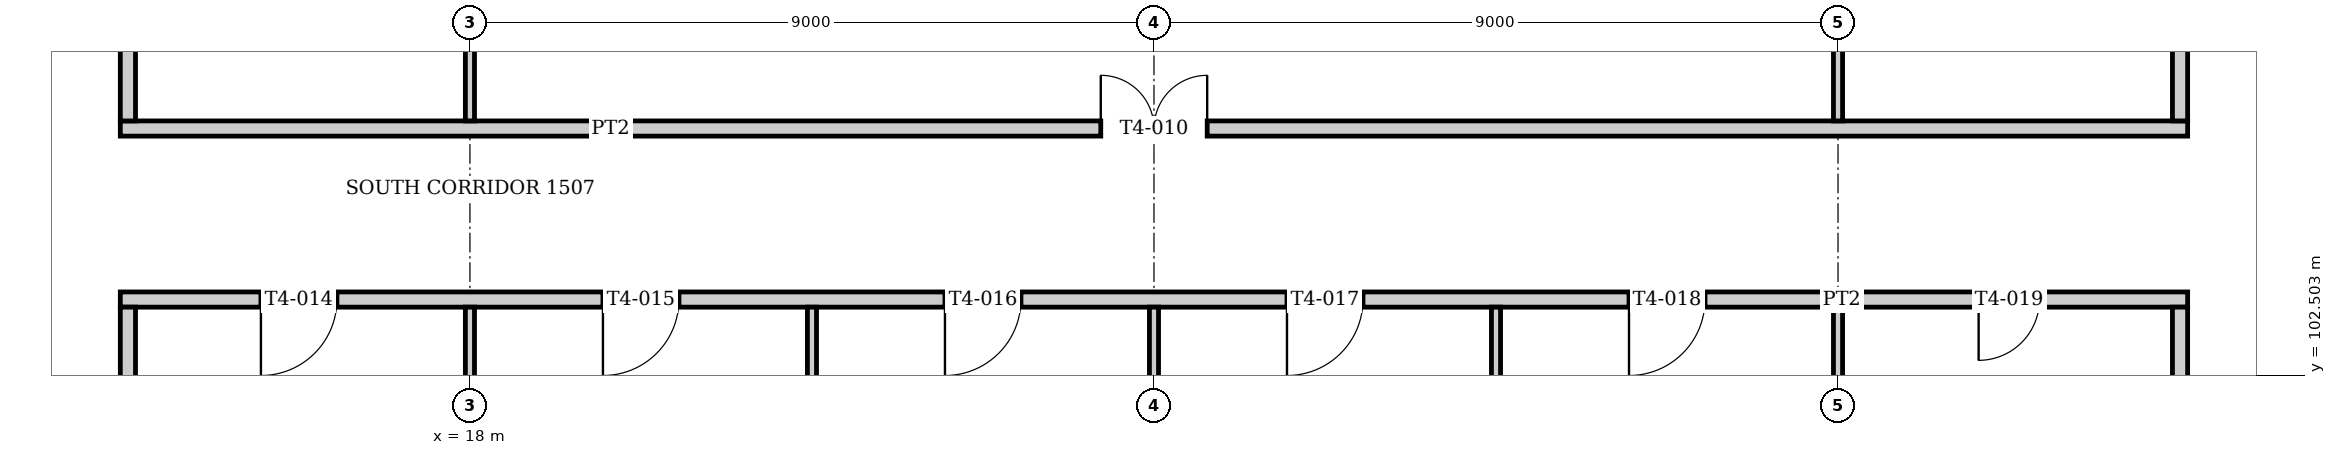
"""IFC4 building model, lengths in metres.
Left out: names, types, materials, properties, quantities, classifications, styles, units other than length and angle.
Written with IfcOpenShell. Run it as: python <this file> out.ifc"""

import sys

from ifc_helpers import new_model, si_unit, direction, frame, frame_2d, origin, place, context, subcontext, project, spatial, rectangle, extrude, element, fill, save


model = new_model("IFC4")
c1 = context("Model", 3, precision=1e-05, world=origin(), true_north=direction((0.0, 1.0)))
c2 = subcontext(c1, "Body", "Model", "MODEL_VIEW")
j1 = project(units=[si_unit("LENGTHUNIT", "METRE"), si_unit("PLANEANGLEUNIT", "RADIAN")], contexts=[c1])
p1 = place(None, origin())
s1 = spatial("IfcSite", under=j1, at=p1, CompositionType="ELEMENT")
p2 = place(p1, origin())
s2 = spatial("IfcBuilding", under=s1, at=p2, CompositionType="ELEMENT")
p3 = place(p2, frame((0.0, 0.0, 63.2)))
s3 = spatial("IfcBuildingStorey", under=s2, at=p3, CompositionType="ELEMENT", Elevation=63.2)
p4 = place(p3, frame((13.4, 103.5, 0.0), z_axis=(0.0, 0.0, 1.0), x_axis=(1.0, 0.0, 0.0)))
e1 = element("IfcWall", 1, at=p4, inside=s3, PredefinedType="PARTITIONING", context=c2, shape_type="SweptSolid", body=[
    extrude(rectangle(XDim=27.2, YDim=0.2, at=frame_2d((13.6, 0.0))), origin(), (0.0, 0.0, 1.0), 3.05),
])
p5 = place(p4, frame((1.85, 0.0, 0.0)))
e2 = element("IfcOpeningElement", 2, at=p5, cuts=e1, PredefinedType="OPENING", context=c2, shape_type="SweptSolid", body=[
    extrude(rectangle(XDim=1.0, YDim=2.1, at=frame_2d((0.5, 1.05))), frame((0.0, 0.11, 0.0), z_axis=(0.0, -1.0, 0.0), x_axis=(1.0, 0.0, 0.0)), (0.0, 0.0, 1.0), 0.22),
])
p6 = place(p4, frame((6.35, 0.0, 0.0)))
e3 = element("IfcOpeningElement", 3, at=p6, cuts=e1, PredefinedType="OPENING", context=c2, shape_type="SweptSolid", body=[
    extrude(rectangle(XDim=1.0, YDim=2.1, at=frame_2d((0.5, 1.05))), frame((0.0, 0.11, 0.0), z_axis=(0.0, -1.0, 0.0), x_axis=(1.0, 0.0, 0.0)), (0.0, 0.0, 1.0), 0.22),
])
p7 = place(p4, frame((10.85, 0.0, 0.0)))
e4 = element("IfcOpeningElement", 4, at=p7, cuts=e1, PredefinedType="OPENING", context=c2, shape_type="SweptSolid", body=[
    extrude(rectangle(XDim=1.0, YDim=2.1, at=frame_2d((0.5, 1.05))), frame((0.0, 0.11, 0.0), z_axis=(0.0, -1.0, 0.0), x_axis=(1.0, 0.0, 0.0)), (0.0, 0.0, 1.0), 0.22),
])
p8 = place(p4, frame((15.35, 0.0, 0.0)))
e5 = element("IfcOpeningElement", 5, at=p8, cuts=e1, PredefinedType="OPENING", context=c2, shape_type="SweptSolid", body=[
    extrude(rectangle(XDim=1.0, YDim=2.1, at=frame_2d((0.5, 1.05))), frame((0.0, 0.11, 0.0), z_axis=(0.0, -1.0, 0.0), x_axis=(1.0, 0.0, 0.0)), (0.0, 0.0, 1.0), 0.22),
])
p9 = place(p4, frame((19.85, 0.0, 0.0)))
e6 = element("IfcOpeningElement", 6, at=p9, cuts=e1, PredefinedType="OPENING", context=c2, shape_type="SweptSolid", body=[
    extrude(rectangle(XDim=1.0, YDim=2.1, at=frame_2d((0.5, 1.05))), frame((0.0, 0.11, 0.0), z_axis=(0.0, -1.0, 0.0), x_axis=(1.0, 0.0, 0.0)), (0.0, 0.0, 1.0), 0.22),
])
p10 = place(p4, frame((24.45, 0.0, 0.0)))
e7 = element("IfcOpeningElement", 7, at=p10, cuts=e1, PredefinedType="OPENING", context=c2, shape_type="SweptSolid", body=[
    extrude(rectangle(XDim=0.8, YDim=2.1, at=frame_2d((0.4, 1.05))), frame((0.0, 0.11, 0.0), z_axis=(0.0, -1.0, 0.0), x_axis=(1.0, 0.0, 0.0)), (0.0, 0.0, 1.0), 0.22),
])
p11 = place(p3, frame((13.4, 105.75, 0.0), z_axis=(0.0, 0.0, 1.0), x_axis=(1.0, 0.0, 0.0)))
e8 = element("IfcWall", 8, at=p11, inside=s3, PredefinedType="PARTITIONING", context=c2, shape_type="SweptSolid", body=[
    extrude(rectangle(XDim=27.2, YDim=0.2, at=frame_2d((13.6, 0.0))), origin(), (0.0, 0.0, 1.0), 3.05),
])
p12 = place(p11, frame((12.9, 0.0, 0.0)))
e9 = element("IfcOpeningElement", 9, at=p12, cuts=e8, PredefinedType="OPENING", context=c2, shape_type="SweptSolid", body=[
    extrude(rectangle(XDim=1.4, YDim=2.1, at=frame_2d((0.7, 1.05))), frame((0.0, 0.11, 0.0), z_axis=(0.0, -1.0, 0.0), x_axis=(1.0, 0.0, 0.0)), (0.0, 0.0, 1.0), 0.22),
])
p13 = place(p3, frame((13.5, 99.075, 0.0), z_axis=(0.0, 0.0, 1.0), x_axis=(0.0, 1.0, 0.0)))
e10 = element("IfcWall", 10, at=p13, inside=s3, PredefinedType="PARTITIONING", context=c2, shape_type="SweptSolid", body=[
    extrude(rectangle(XDim=4.325, YDim=0.2, at=frame_2d((2.163, 0.0))), origin(), (0.0, 0.0, 1.0), 3.05),
])
p14 = place(p3, frame((13.5, 105.85, 0.0), z_axis=(0.0, 0.0, 1.0), x_axis=(0.0, 1.0, 0.0)))
e11 = element("IfcWall", 11, at=p14, inside=s3, PredefinedType="PARTITIONING", context=c2, shape_type="SweptSolid", body=[
    extrude(rectangle(XDim=4.3, YDim=0.2, at=frame_2d((2.15, 0.0))), origin(), (0.0, 0.0, 1.0), 3.05),
])
p15 = place(p14, frame((1.69, 0.0, 0.0)))
e12 = element("IfcOpeningElement", 12, at=p15, cuts=e11, PredefinedType="OPENING", context=c2, shape_type="SweptSolid", body=[
    extrude(rectangle(XDim=0.92, YDim=2.1, at=frame_2d((0.46, 1.05))), frame((0.0, 0.11, 0.0), z_axis=(0.0, -1.0, 0.0), x_axis=(1.0, 0.0, 0.0)), (0.0, 0.0, 1.0), 0.22),
])
p16 = place(p3, frame((18.0, 99.157, 0.0), z_axis=(0.0, 0.0, 1.0), x_axis=(0.0, 1.0, 0.0)))
e13 = element("IfcWall", 13, at=p16, inside=s3, PredefinedType="PARTITIONING", context=c2, shape_type="SweptSolid", body=[
    extrude(rectangle(XDim=4.242, YDim=0.12, at=frame_2d((2.121, 0.0))), origin(), (0.0, 0.0, 1.0), 3.05),
])
p17 = place(p3, frame((18.0, 105.85, 0.0), z_axis=(0.0, 0.0, 1.0), x_axis=(0.0, 1.0, 0.0)))
e14 = element("IfcWall", 14, at=p17, inside=s3, PredefinedType="PARTITIONING", context=c2, shape_type="SweptSolid", body=[
    extrude(rectangle(XDim=4.3, YDim=0.12, at=frame_2d((2.15, 0.0))), origin(), (0.0, 0.0, 1.0), 3.05),
])
p18 = place(p3, frame((22.5, 99.075, 0.0), z_axis=(0.0, 0.0, 1.0), x_axis=(0.0, 1.0, 0.0)))
e15 = element("IfcWall", 15, at=p18, inside=s3, PredefinedType="PARTITIONING", context=c2, shape_type="SweptSolid", body=[
    extrude(rectangle(XDim=4.325, YDim=0.12, at=frame_2d((2.163, 0.0))), origin(), (0.0, 0.0, 1.0), 3.05),
])
p19 = place(p3, frame((27.0, 99.157, 0.0), z_axis=(0.0, 0.0, 1.0), x_axis=(0.0, 1.0, 0.0)))
e16 = element("IfcWall", 16, at=p19, inside=s3, PredefinedType="PARTITIONING", context=c2, shape_type="SweptSolid", body=[
    extrude(rectangle(XDim=4.242, YDim=0.12, at=frame_2d((2.121, 0.0))), origin(), (0.0, 0.0, 1.0), 3.05),
])
p20 = place(p3, frame((31.5, 99.075, 0.0), z_axis=(0.0, 0.0, 1.0), x_axis=(0.0, 1.0, 0.0)))
e17 = element("IfcWall", 17, at=p20, inside=s3, PredefinedType="PARTITIONING", context=c2, shape_type="SweptSolid", body=[
    extrude(rectangle(XDim=4.325, YDim=0.12, at=frame_2d((2.163, 0.0))), origin(), (0.0, 0.0, 1.0), 3.05),
])
p21 = place(p3, frame((36.0, 99.157, 0.0), z_axis=(0.0, 0.0, 1.0), x_axis=(0.0, 1.0, 0.0)))
e18 = element("IfcWall", 18, at=p21, inside=s3, PredefinedType="PARTITIONING", context=c2, shape_type="SweptSolid", body=[
    extrude(rectangle(XDim=4.242, YDim=0.12, at=frame_2d((2.121, 0.0))), origin(), (0.0, 0.0, 1.0), 3.05),
])
p22 = place(p3, frame((36.0, 105.85, 0.0), z_axis=(0.0, 0.0, 1.0), x_axis=(0.0, 1.0, 0.0)))
e19 = element("IfcWall", 19, at=p22, inside=s3, PredefinedType="PARTITIONING", context=c2, shape_type="SweptSolid", body=[
    extrude(rectangle(XDim=4.3, YDim=0.12, at=frame_2d((2.15, 0.0))), origin(), (0.0, 0.0, 1.0), 3.05),
])
p23 = place(p3, frame((40.5, 99.075, 0.0), z_axis=(0.0, 0.0, 1.0), x_axis=(0.0, 1.0, 0.0)))
e20 = element("IfcWall", 20, at=p23, inside=s3, PredefinedType="PARTITIONING", context=c2, shape_type="SweptSolid", body=[
    extrude(rectangle(XDim=4.325, YDim=0.2, at=frame_2d((2.163, 0.0))), origin(), (0.0, 0.0, 1.0), 3.05),
])
p24 = place(p3, frame((40.5, 105.85, 0.0), z_axis=(0.0, 0.0, 1.0), x_axis=(0.0, 1.0, 0.0)))
e21 = element("IfcWall", 21, at=p24, inside=s3, PredefinedType="PARTITIONING", context=c2, shape_type="SweptSolid", body=[
    extrude(rectangle(XDim=4.3, YDim=0.2, at=frame_2d((2.15, 0.0))), origin(), (0.0, 0.0, 1.0), 3.05),
])
p25 = place(p24, frame((1.69, 0.0, 0.0)))
e22 = element("IfcOpeningElement", 22, at=p25, cuts=e21, PredefinedType="OPENING", context=c2, shape_type="SweptSolid", body=[
    extrude(rectangle(XDim=0.92, YDim=2.1, at=frame_2d((0.46, 1.05))), frame((0.0, 0.11, 0.0), z_axis=(0.0, -1.0, 0.0), x_axis=(1.0, 0.0, 0.0)), (0.0, 0.0, 1.0), 0.22),
])
p26 = place(p12, origin())
e23 = element("IfcDoor", 23, at=p26, inside=s3, OperationType="DOUBLE_DOOR_SINGLE_SWING", PredefinedType="DOOR", context=c2, shape_type="SweptSolid", body=[
    extrude(rectangle(XDim=1.4, YDim=2.1, at=frame_2d((0.7, 1.05))), frame((0.0, 0.025, 0.0), z_axis=(0.0, -1.0, 0.0), x_axis=(1.0, 0.0, 0.0)), (0.0, 0.0, 1.0), 0.05),
])
fill(e9, e23)
p27 = place(p5, frame((1.0, 0.0, 0.0), z_axis=(0.0, 0.0, 1.0), x_axis=(-1.0, 0.0, 0.0)))
e24 = element("IfcDoor", 24, at=p27, inside=s3, OperationType="SINGLE_SWING_RIGHT", PredefinedType="DOOR", context=c2, shape_type="SweptSolid", body=[
    extrude(rectangle(XDim=1.0, YDim=2.1, at=frame_2d((0.5, 1.05))), frame((0.0, 0.025, 0.0), z_axis=(0.0, -1.0, 0.0), x_axis=(1.0, 0.0, 0.0)), (0.0, 0.0, 1.0), 0.05),
])
fill(e2, e24)
p28 = place(p6, frame((1.0, 0.0, 0.0), z_axis=(0.0, 0.0, 1.0), x_axis=(-1.0, 0.0, 0.0)))
e25 = element("IfcDoor", 25, at=p28, inside=s3, OperationType="SINGLE_SWING_RIGHT", PredefinedType="DOOR", context=c2, shape_type="SweptSolid", body=[
    extrude(rectangle(XDim=1.0, YDim=2.1, at=frame_2d((0.5, 1.05))), frame((0.0, 0.025, 0.0), z_axis=(0.0, -1.0, 0.0), x_axis=(1.0, 0.0, 0.0)), (0.0, 0.0, 1.0), 0.05),
])
fill(e3, e25)
p29 = place(p7, frame((1.0, 0.0, 0.0), z_axis=(0.0, 0.0, 1.0), x_axis=(-1.0, 0.0, 0.0)))
e26 = element("IfcDoor", 26, at=p29, inside=s3, OperationType="SINGLE_SWING_RIGHT", PredefinedType="DOOR", context=c2, shape_type="SweptSolid", body=[
    extrude(rectangle(XDim=1.0, YDim=2.1, at=frame_2d((0.5, 1.05))), frame((0.0, 0.025, 0.0), z_axis=(0.0, -1.0, 0.0), x_axis=(1.0, 0.0, 0.0)), (0.0, 0.0, 1.0), 0.05),
])
fill(e4, e26)
p30 = place(p8, frame((1.0, 0.0, 0.0), z_axis=(0.0, 0.0, 1.0), x_axis=(-1.0, 0.0, 0.0)))
e27 = element("IfcDoor", 27, at=p30, inside=s3, OperationType="SINGLE_SWING_RIGHT", PredefinedType="DOOR", context=c2, shape_type="SweptSolid", body=[
    extrude(rectangle(XDim=1.0, YDim=2.1, at=frame_2d((0.5, 1.05))), frame((0.0, 0.025, 0.0), z_axis=(0.0, -1.0, 0.0), x_axis=(1.0, 0.0, 0.0)), (0.0, 0.0, 1.0), 0.05),
])
fill(e5, e27)
p31 = place(p9, frame((1.0, 0.0, 0.0), z_axis=(0.0, 0.0, 1.0), x_axis=(-1.0, 0.0, 0.0)))
e28 = element("IfcDoor", 28, at=p31, inside=s3, OperationType="SINGLE_SWING_RIGHT", PredefinedType="DOOR", context=c2, shape_type="SweptSolid", body=[
    extrude(rectangle(XDim=1.0, YDim=2.1, at=frame_2d((0.5, 1.05))), frame((0.0, 0.025, 0.0), z_axis=(0.0, -1.0, 0.0), x_axis=(1.0, 0.0, 0.0)), (0.0, 0.0, 1.0), 0.05),
])
fill(e6, e28)
p32 = place(p10, frame((0.8, 0.0, 0.0), z_axis=(0.0, 0.0, 1.0), x_axis=(-1.0, 0.0, 0.0)))
e29 = element("IfcDoor", 29, at=p32, inside=s3, OperationType="SINGLE_SWING_RIGHT", PredefinedType="DOOR", context=c2, shape_type="SweptSolid", body=[
    extrude(rectangle(XDim=0.8, YDim=2.1, at=frame_2d((0.4, 1.05))), frame((0.0, 0.025, 0.0), z_axis=(0.0, -1.0, 0.0), x_axis=(1.0, 0.0, 0.0)), (0.0, 0.0, 1.0), 0.05),
])
fill(e7, e29)
save(model, sys.argv[1])
